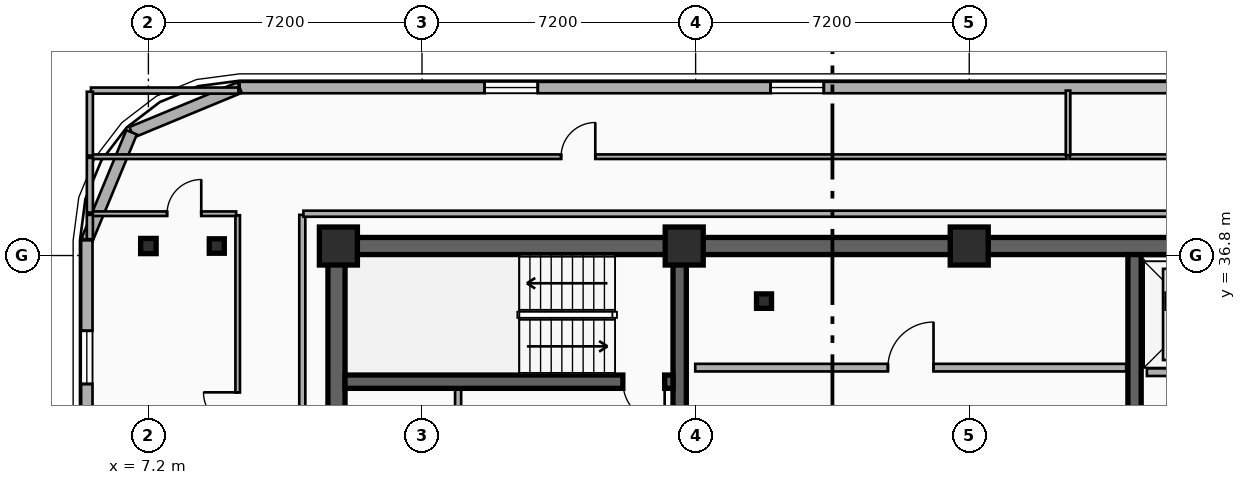
"""IFC4 building model, lengths in metres.
Left out: names, types, materials, properties, quantities, classifications, styles, units other than length and angle.
Written with IfcOpenShell. Run it as: python <this file> out.ifc"""

import sys

from ifc_helpers import new_model, si_unit, direction, frame, frame_2d, origin, origin_2d, place, context, subcontext, project, spatial, rectangle, i_section, extrude, element, fill, save


model = new_model("IFC4")
c1 = context("Model", 3, precision=1e-05, world=origin(), true_north=direction((0.0, 1.0)))
c2 = subcontext(c1, "Body", "Model", "MODEL_VIEW")
j1 = project(units=[si_unit("LENGTHUNIT", "METRE"), si_unit("PLANEANGLEUNIT", "RADIAN")], contexts=[c1])
p1 = place(None, origin())
s1 = spatial("IfcSite", under=j1, at=p1, CompositionType="ELEMENT")
p2 = place(p1, origin())
s2 = spatial("IfcBuilding", under=s1, at=p2, CompositionType="ELEMENT")
p3 = place(p2, frame((0.0, 0.0, 236.4)))
s3 = spatial("IfcBuildingStorey", under=s2, at=p3, CompositionType="ELEMENT", Elevation=236.4)
p4 = place(p3, frame((12.15, 37.05, 0.0), z_axis=(0.0, 0.0, 1.0), x_axis=(1.0, 0.0, 0.0)))
e1 = element("IfcWall", 1, at=p4, inside=s3, PredefinedType="SHEAR", context=c2, shape_type="SweptSolid", body=[
    extrude(rectangle(XDim=33.23, YDim=0.45, at=frame_2d((16.615, 0.0))), origin(), (0.0, 0.0, 1.0), 3.6),
])
p5 = place(p3, frame((12.15, 28.045, 0.0), z_axis=(0.0, 0.0, 1.0), x_axis=(0.0, 1.0, 0.0)))
e2 = element("IfcWall", 2, at=p5, inside=s3, PredefinedType="SHEAR", context=c2, shape_type="SweptSolid", body=[
    extrude(rectangle(XDim=8.78, YDim=0.45, at=frame_2d((4.39, 0.0))), origin(), (0.0, 0.0, 1.0), 3.6),
])
for number, where, z_axis, x_axis in (
    (3, (21.18, 28.045, 0.0), (0.0, 0.0, 1.0), (0.0, 1.0, 0.0)),
    (4, (33.15, 28.045, 0.0), (0.0, 0.0, 1.0), (0.0, 1.0, 0.0)),
):
    element("IfcWall", number, at=place(p3, frame(where, z_axis=z_axis, x_axis=x_axis)), inside=s3, PredefinedType="SHEAR", context=c2, shape_type="SweptSolid", body=[
        extrude(rectangle(XDim=8.78, YDim=0.35, at=frame_2d((4.39, 0.0))), origin(), (0.0, 0.0, 1.0), 3.6),
    ])
p6 = place(p3, frame((21.005, 33.48, 0.0), z_axis=(0.0, 0.0, 1.0), x_axis=(-1.0, 0.0, 0.0)))
e5 = element("IfcWall", 5, at=p6, inside=s3, PredefinedType="SHEAR", context=c2, shape_type="SweptSolid", body=[
    extrude(rectangle(XDim=8.63, YDim=0.35, at=frame_2d((4.315, 0.0))), origin(), (0.0, 0.0, 1.0), 3.6),
])
p7 = place(p6, frame((0.22, 0.0, 0.0)))
e6 = element("IfcOpeningElement", 6, at=p7, cuts=e5, PredefinedType="OPENING", context=c2, shape_type="SweptSolid", body=[
    extrude(rectangle(XDim=1.1, YDim=2.15, at=frame_2d((0.55, 1.075))), frame((0.0, 0.185, 0.0), z_axis=(0.0, -1.0, 0.0), x_axis=(1.0, 0.0, 0.0)), (0.0, 0.0, 1.0), 0.37),
])
p8 = place(p3, frame((23.4, 35.6, 0.0), z_axis=(0.0, 0.0, 1.0), x_axis=(1.0, 0.0, 0.0)))
e7 = element("IfcColumn", 7, at=p8, inside=s3, PredefinedType="COLUMN", context=c2, shape_type="SweptSolid", body=[
    extrude(i_section(OverallWidth=0.395, OverallDepth=0.38, WebThickness=0.019, FlangeThickness=0.03, FilletRadius=0.015, at=origin_2d()), origin(), (0.0, 0.0, 1.0), 3.6),
])
for number, where, z_axis, x_axis in (
    (8, (12.2, 37.05, 0.0), (0.0, 0.0, 1.0), (1.0, 0.0, 0.0)),
    (9, (21.3, 37.05, 0.0), (0.0, 0.0, 1.0), (1.0, 0.0, 0.0)),
    (10, (28.8, 37.05, 0.0), (0.0, 0.0, 1.0), (1.0, 0.0, 0.0)),
):
    element("IfcColumn", number, at=place(p3, frame(where, z_axis=z_axis, x_axis=x_axis)), inside=s3, PredefinedType="COLUMN", context=c2, shape_type="SweptSolid", body=[
        extrude(rectangle(XDim=1.0, YDim=1.0, at=origin_2d()), origin(), (0.0, 0.0, 1.0), 3.6),
    ])
p9 = place(p3, frame((9.0, 37.05, 0.0), z_axis=(0.0, 0.0, 1.0), x_axis=(1.0, 0.0, 0.0)))
e11 = element("IfcColumn", 11, at=p9, inside=s3, PredefinedType="COLUMN", context=c2, shape_type="SweptSolid", body=[
    extrude(i_section(OverallWidth=0.395, OverallDepth=0.38, WebThickness=0.019, FlangeThickness=0.03, FilletRadius=0.015, at=origin_2d()), origin(), (0.0, 0.0, 1.0), 3.6),
])
p10 = place(p3, frame((7.2, 37.05, 0.0), z_axis=(0.0, 0.0, 1.0), x_axis=(1.0, 0.0, 0.0)))
e12 = element("IfcColumn", 12, at=p10, inside=s3, PredefinedType="COLUMN", context=c2, shape_type="SweptSolid", body=[
    extrude(i_section(OverallWidth=0.408, OverallDepth=0.4, WebThickness=0.025, FlangeThickness=0.039, FilletRadius=0.015, at=origin_2d()), origin(), (0.0, 0.0, 1.0), 3.6),
])
p11 = place(p3, frame((9.6, 41.22, 0.0), z_axis=(0.0, 0.0, 1.0), x_axis=(1.0, 0.0, 0.0)))
e13 = element("IfcWall", 13, at=p11, inside=s3, PredefinedType="SOLIDWALL", context=c2, shape_type="SweptSolid", body=[
    extrude(rectangle(XDim=38.4, YDim=0.3, at=frame_2d((19.2, 0.0))), origin(), (0.0, 0.0, 1.0), 3.34),
])
p12 = place(p11, frame((6.447, 0.0, 0.75)))
e14 = element("IfcOpeningElement", 14, at=p12, cuts=e13, PredefinedType="OPENING", context=c2, shape_type="SweptSolid", body=[
    extrude(rectangle(XDim=1.4, YDim=2.1, at=frame_2d((0.7, 1.05))), frame((0.0, 0.16, 0.0), z_axis=(0.0, -1.0, 0.0), x_axis=(1.0, 0.0, 0.0)), (0.0, 0.0, 1.0), 0.32),
])
p13 = place(p11, frame((13.973, 0.0, 0.75)))
e15 = element("IfcOpeningElement", 15, at=p13, cuts=e13, PredefinedType="OPENING", context=c2, shape_type="SweptSolid", body=[
    extrude(rectangle(XDim=1.4, YDim=2.1, at=frame_2d((0.7, 1.05))), frame((0.0, 0.16, 0.0), z_axis=(0.0, -1.0, 0.0), x_axis=(1.0, 0.0, 0.0)), (0.0, 0.0, 1.0), 0.32),
])
p14 = place(p11, frame((26.493, 0.0, 0.75)))
e16 = element("IfcOpeningElement", 16, at=p14, cuts=e13, PredefinedType="OPENING", context=c2, shape_type="SweptSolid", body=[
    extrude(rectangle(XDim=1.4, YDim=2.1, at=frame_2d((0.7, 1.05))), frame((0.0, 0.16, 0.0), z_axis=(0.0, -1.0, 0.0), x_axis=(1.0, 0.0, 0.0)), (0.0, 0.0, 1.0), 0.32),
])
p15 = place(p11, frame((32.287, 0.0, 0.75)))
e17 = element("IfcOpeningElement", 17, at=p15, cuts=e13, PredefinedType="OPENING", context=c2, shape_type="SweptSolid", body=[
    extrude(rectangle(XDim=1.4, YDim=2.1, at=frame_2d((0.7, 1.05))), frame((0.0, 0.16, 0.0), z_axis=(0.0, -1.0, 0.0), x_axis=(1.0, 0.0, 0.0)), (0.0, 0.0, 1.0), 0.32),
])
p16 = place(p3, frame((6.757, 40.042, 0.0), z_axis=(0.0, 0.0, 1.0), x_axis=(0.923882414032, 0.382676475685, 0.0)))
e18 = element("IfcWall", 18, at=p16, inside=s3, PredefinedType="SOLIDWALL", context=c2, shape_type="SweptSolid", body=[
    extrude(rectangle(XDim=3.077, YDim=0.3, at=frame_2d((1.539, 0.0))), origin(), (0.0, 0.0, 1.0), 3.34),
])
p17 = place(p3, frame((5.58, 37.2, 0.0), z_axis=(0.0, 0.0, 1.0), x_axis=(0.382636798336, 0.92389884758, 0.0)))
e19 = element("IfcWall", 19, at=p17, inside=s3, PredefinedType="SOLIDWALL", context=c2, shape_type="SweptSolid", body=[
    extrude(rectangle(XDim=3.077, YDim=0.3, at=frame_2d((1.538, 0.0))), origin(), (0.0, 0.0, 1.0), 3.34),
])
p18 = place(p3, frame((5.58, 8.6, 0.0), z_axis=(0.0, 0.0, 1.0), x_axis=(0.0, 1.0, 0.0)))
e20 = element("IfcWall", 20, at=p18, inside=s3, PredefinedType="SOLIDWALL", context=c2, shape_type="SweptSolid", body=[
    extrude(rectangle(XDim=28.6, YDim=0.3, at=frame_2d((14.3, 0.0))), origin(), (0.0, 0.0, 1.0), 3.34),
])
p19 = place(p18, frame((21.36, 0.0, 0.34)))
e21 = element("IfcOpeningElement", 21, at=p19, cuts=e20, PredefinedType="OPENING", context=c2, shape_type="SweptSolid", body=[
    extrude(rectangle(XDim=1.4, YDim=2.1, at=frame_2d((0.7, 1.05))), frame((0.0, 0.16, 0.0), z_axis=(0.0, -1.0, 0.0), x_axis=(1.0, 0.0, 0.0)), (0.0, 0.0, 1.0), 0.32),
])
p20 = place(p18, frame((24.82, 0.0, 0.34)))
e22 = element("IfcOpeningElement", 22, at=p20, cuts=e20, PredefinedType="OPENING", context=c2, shape_type="SweptSolid", body=[
    extrude(rectangle(XDim=1.4, YDim=2.1, at=frame_2d((0.7, 1.05))), frame((0.0, 0.16, 0.0), z_axis=(0.0, -1.0, 0.0), x_axis=(1.0, 0.0, 0.0)), (0.0, 0.0, 1.0), 0.32),
])
p21 = place(p18, frame((4.797, 0.0, 0.34)))
e23 = element("IfcOpeningElement", 23, at=p21, cuts=e20, PredefinedType="OPENING", context=c2, shape_type="SweptSolid", body=[
    extrude(rectangle(XDim=1.4, YDim=2.1, at=frame_2d((0.7, 1.05))), frame((0.0, 0.16, 0.0), z_axis=(0.0, -1.0, 0.0), x_axis=(1.0, 0.0, 0.0)), (0.0, 0.0, 1.0), 0.32),
])
p22 = place(p18, frame((10.673, 0.0, 0.34)))
e24 = element("IfcOpeningElement", 24, at=p22, cuts=e20, PredefinedType="OPENING", context=c2, shape_type="SweptSolid", body=[
    extrude(rectangle(XDim=1.4, YDim=2.1, at=frame_2d((0.7, 1.05))), frame((0.0, 0.16, 0.0), z_axis=(0.0, -1.0, 0.0), x_axis=(1.0, 0.0, 0.0)), (0.0, 0.0, 1.0), 0.32),
])
p23 = place(p3, frame((33.475, 33.73, 0.0), z_axis=(0.0, 0.0, 1.0), x_axis=(1.0, 0.0, 0.0)))
e25 = element("IfcWall", 25, at=p23, inside=s3, PredefinedType="PARTITIONING", context=c2, shape_type="SweptSolid", body=[
    extrude(rectangle(XDim=2.725, YDim=0.2, at=frame_2d((1.362, 0.0))), origin(), (0.0, 0.0, 1.0), 2.41),
])
p24 = place(p23, frame((0.812, 0.0, 0.0)))
e26 = element("IfcOpeningElement", 26, at=p24, cuts=e25, PredefinedType="OPENING", context=c2, shape_type="SweptSolid", body=[
    extrude(rectangle(XDim=1.1, YDim=2.15, at=frame_2d((0.55, 1.075))), frame((0.0, 0.11, 0.0), z_axis=(0.0, -1.0, 0.0), x_axis=(1.0, 0.0, 0.0)), (0.0, 0.0, 1.0), 0.22),
])
p25 = place(p3, frame((21.59, 33.85, 0.0), z_axis=(0.0, 0.0, 1.0), x_axis=(1.0, 0.0, 0.0)))
e27 = element("IfcWall", 27, at=p25, inside=s3, PredefinedType="PARTITIONING", context=c2, shape_type="SweptSolid", body=[
    extrude(rectangle(XDim=11.34, YDim=0.2, at=frame_2d((5.67, 0.0))), origin(), (0.0, 0.0, 1.0), 2.41),
])
p26 = place(p25, frame((5.07, 0.0, 0.0)))
e28 = element("IfcOpeningElement", 28, at=p26, cuts=e27, PredefinedType="OPENING", context=c2, shape_type="SweptSolid", body=[
    extrude(rectangle(XDim=1.2, YDim=2.15, at=frame_2d((0.6, 1.075))), frame((0.0, 0.11, 0.0), z_axis=(0.0, -1.0, 0.0), x_axis=(1.0, 0.0, 0.0)), (0.0, 0.0, 1.0), 0.22),
])
p27 = place(p3, frame((9.55, 27.64, 0.0), z_axis=(0.0, 0.0, 1.0), x_axis=(0.0, 1.0, 0.0)))
e29 = element("IfcWall", 29, at=p27, inside=s3, PredefinedType="PARTITIONING", context=c2, shape_type="SweptSolid", body=[
    extrude(rectangle(XDim=10.22, YDim=0.12, at=frame_2d((5.11, 0.0))), origin(), (0.0, 0.0, 1.0), 2.82),
])
p28 = place(p27, frame((4.66, 0.0, 0.0)))
e30 = element("IfcOpeningElement", 30, at=p28, cuts=e29, PredefinedType="OPENING", context=c2, shape_type="SweptSolid", body=[
    extrude(rectangle(XDim=0.9, YDim=2.1, at=frame_2d((0.45, 1.05))), frame((0.0, 0.07, 0.0), z_axis=(0.0, -1.0, 0.0), x_axis=(1.0, 0.0, 0.0)), (0.0, 0.0, 1.0), 0.14),
])
p29 = place(p3, frame((5.66, 37.9, 0.0), z_axis=(0.0, 0.0, 1.0), x_axis=(1.0, 0.0, 0.0)))
e31 = element("IfcWall", 31, at=p29, inside=s3, PredefinedType="PARTITIONING", context=c2, shape_type="SweptSolid", body=[
    extrude(rectangle(XDim=3.85, YDim=0.12, at=frame_2d((1.925, 0.0))), origin(), (0.0, 0.0, 1.0), 3.34),
])
p30 = place(p29, frame((2.031, 0.0, 0.0)))
e32 = element("IfcOpeningElement", 32, at=p30, cuts=e31, PredefinedType="OPENING", context=c2, shape_type="SweptSolid", body=[
    extrude(rectangle(XDim=0.9, YDim=2.1, at=frame_2d((0.45, 1.05))), frame((0.0, 0.07, 0.0), z_axis=(0.0, -1.0, 0.0), x_axis=(1.0, 0.0, 0.0)), (0.0, 0.0, 1.0), 0.14),
])
p31 = place(p3, frame((5.66, 39.4, 0.0), z_axis=(0.0, 0.0, 1.0), x_axis=(1.0, 0.0, 0.0)))
e33 = element("IfcWall", 33, at=p31, inside=s3, PredefinedType="PARTITIONING", context=c2, shape_type="SweptSolid", body=[
    extrude(rectangle(XDim=25.7, YDim=0.12, at=frame_2d((12.85, 0.0))), origin(), (0.0, 0.0, 1.0), 3.34),
])
p32 = place(p31, frame((12.4, 0.0, 0.0)))
e34 = element("IfcOpeningElement", 34, at=p32, cuts=e33, PredefinedType="OPENING", context=c2, shape_type="SweptSolid", body=[
    extrude(rectangle(XDim=0.9, YDim=2.1, at=frame_2d((0.45, 1.05))), frame((0.0, 0.07, 0.0), z_axis=(0.0, -1.0, 0.0), x_axis=(1.0, 0.0, 0.0)), (0.0, 0.0, 1.0), 0.14),
])
p33 = place(p3, frame((31.44, 39.4, 0.0), z_axis=(0.0, 0.0, 1.0), x_axis=(1.0, 0.0, 0.0)))
e35 = element("IfcWall", 35, at=p33, inside=s3, PredefinedType="PARTITIONING", context=c2, shape_type="SweptSolid", body=[
    extrude(rectangle(XDim=20.5, YDim=0.12, at=frame_2d((10.25, 0.0))), origin(), (0.0, 0.0, 1.0), 3.34),
])
p34 = place(p33, frame((9.8, 0.0, 0.0)))
e36 = element("IfcOpeningElement", 36, at=p34, cuts=e35, PredefinedType="OPENING", context=c2, shape_type="SweptSolid", body=[
    extrude(rectangle(XDim=0.9, YDim=2.1, at=frame_2d((0.45, 1.05))), frame((0.0, 0.07, 0.0), z_axis=(0.0, -1.0, 0.0), x_axis=(1.0, 0.0, 0.0)), (0.0, 0.0, 1.0), 0.14),
])
p35 = place(p3, frame((31.4, 39.44, 0.0), z_axis=(0.0, 0.0, 1.0), x_axis=(0.0, 1.0, 0.0)))
e37 = element("IfcWall", 37, at=p35, inside=s3, PredefinedType="PARTITIONING", context=c2, shape_type="SweptSolid", body=[
    extrude(rectangle(XDim=1.7, YDim=0.12, at=frame_2d((0.85, 0.0))), origin(), (0.0, 0.0, 1.0), 3.34),
])
p36 = place(p3, frame((15.35, 30.96, 0.0), z_axis=(0.0, 0.0, 1.0), x_axis=(0.0, 1.0, 0.0)))
e38 = element("IfcWall", 38, at=p36, inside=s3, PredefinedType="PARTITIONING", context=c2, shape_type="SweptSolid", body=[
    extrude(rectangle(XDim=2.31, YDim=0.16, at=frame_2d((1.155, 0.0))), origin(), (0.0, 0.0, 1.0), 3.34),
])
p37 = place(p3, frame((11.25, 27.63, 0.0), z_axis=(0.0, 0.0, 1.0), x_axis=(0.0, 1.0, 0.0)))
e39 = element("IfcWall", 39, at=p37, inside=s3, PredefinedType="PARTITIONING", context=c2, shape_type="SweptSolid", body=[
    extrude(rectangle(XDim=10.24, YDim=0.16, at=frame_2d((5.12, 0.0))), origin(), (0.0, 0.0, 1.0), 2.82),
])
p38 = place(p3, frame((11.28, 37.9, 0.0), z_axis=(0.0, 0.0, 1.0), x_axis=(1.0, 0.0, 0.0)))
e40 = element("IfcWall", 40, at=p38, inside=s3, PredefinedType="PARTITIONING", context=c2, shape_type="SweptSolid", body=[
    extrude(rectangle(XDim=35.04, YDim=0.16, at=frame_2d((17.52, 0.0))), origin(), (0.0, 0.0, 1.0), 3.34),
])
p39 = place(p3, frame((5.66, 37.93, 0.0), z_axis=(0.0, 0.0, 1.0), x_axis=(0.0, 1.0, 0.0)))
e41 = element("IfcWall", 41, at=p39, inside=s3, PredefinedType="PARTITIONING", context=c2, shape_type="SweptSolid", body=[
    extrude(rectangle(XDim=1.44, YDim=0.16, at=frame_2d((0.72, 0.0))), origin(), (0.0, 0.0, 1.0), 3.34),
])
p40 = place(p3, frame((5.66, 37.23, 0.0), z_axis=(0.0, 0.0, 1.0), x_axis=(0.0, 1.0, 0.0)))
e42 = element("IfcWall", 42, at=p40, inside=s3, PredefinedType="PARTITIONING", context=c2, shape_type="SweptSolid", body=[
    extrude(rectangle(XDim=0.64, YDim=0.16, at=frame_2d((0.32, 0.0))), origin(), (0.0, 0.0, 1.0), 3.34),
])
p41 = place(p3, frame((5.69, 41.14, 0.0), z_axis=(0.0, 0.0, 1.0), x_axis=(1.0, 0.0, 0.0)))
e43 = element("IfcWall", 43, at=p41, inside=s3, PredefinedType="PARTITIONING", context=c2, shape_type="SweptSolid", body=[
    extrude(rectangle(XDim=3.88, YDim=0.16, at=frame_2d((1.94, 0.0))), origin(), (0.0, 0.0, 1.0), 3.34),
])
p42 = place(p3, frame((5.66, 39.43, 0.0), z_axis=(0.0, 0.0, 1.0), x_axis=(0.0, 1.0, 0.0)))
e44 = element("IfcWall", 44, at=p42, inside=s3, PredefinedType="PARTITIONING", context=c2, shape_type="SweptSolid", body=[
    extrude(rectangle(XDim=1.68, YDim=0.16, at=frame_2d((0.84, 0.0))), origin(), (0.0, 0.0, 1.0), 3.34),
])
p43 = place(p12, origin())
e45 = element("IfcWindow", 45, at=p43, inside=s3, PartitioningType="SINGLE_PANEL", PredefinedType="WINDOW", context=c2, shape_type="SweptSolid", body=[
    extrude(rectangle(XDim=1.4, YDim=2.1, at=frame_2d((0.7, 1.05))), frame((0.0, 0.03, 0.0), z_axis=(0.0, -1.0, 0.0), x_axis=(1.0, 0.0, 0.0)), (0.0, 0.0, 1.0), 0.06),
])
fill(e14, e45)
p44 = place(p13, origin())
e46 = element("IfcWindow", 46, at=p44, inside=s3, PartitioningType="SINGLE_PANEL", PredefinedType="WINDOW", context=c2, shape_type="SweptSolid", body=[
    extrude(rectangle(XDim=1.4, YDim=2.1, at=frame_2d((0.7, 1.05))), frame((0.0, 0.03, 0.0), z_axis=(0.0, -1.0, 0.0), x_axis=(1.0, 0.0, 0.0)), (0.0, 0.0, 1.0), 0.06),
])
fill(e15, e46)
p45 = place(p20, origin())
e47 = element("IfcWindow", 47, at=p45, inside=s3, PartitioningType="SINGLE_PANEL", PredefinedType="WINDOW", context=c2, shape_type="SweptSolid", body=[
    extrude(rectangle(XDim=1.4, YDim=2.1, at=frame_2d((0.7, 1.05))), frame((0.0, 0.03, 0.0), z_axis=(0.0, -1.0, 0.0), x_axis=(1.0, 0.0, 0.0)), (0.0, 0.0, 1.0), 0.06),
])
fill(e22, e47)
p46 = place(p7, origin())
e48 = element("IfcDoor", 48, at=p46, inside=s3, OperationType="SINGLE_SWING_LEFT", PredefinedType="DOOR", context=c2, shape_type="SweptSolid", body=[
    extrude(rectangle(XDim=1.1, YDim=2.15, at=frame_2d((0.55, 1.075))), frame((0.0, 0.025, 0.0), z_axis=(0.0, -1.0, 0.0), x_axis=(1.0, 0.0, 0.0)), (0.0, 0.0, 1.0), 0.05),
])
fill(e6, e48)
p47 = place(p26, origin())
e49 = element("IfcDoor", 49, at=p47, inside=s3, OperationType="SINGLE_SWING_RIGHT", PredefinedType="DOOR", context=c2, shape_type="SweptSolid", body=[
    extrude(rectangle(XDim=1.2, YDim=2.15, at=frame_2d((0.6, 1.075))), frame((0.0, 0.025, 0.0), z_axis=(0.0, -1.0, 0.0), x_axis=(1.0, 0.0, 0.0)), (0.0, 0.0, 1.0), 0.05),
])
fill(e28, e49)
p48 = place(p28, origin())
e50 = element("IfcDoor", 50, at=p48, inside=s3, OperationType="SINGLE_SWING_RIGHT", PredefinedType="DOOR", context=c2, shape_type="SweptSolid", body=[
    extrude(rectangle(XDim=0.9, YDim=2.1, at=frame_2d((0.45, 1.05))), frame((0.0, 0.025, 0.0), z_axis=(0.0, -1.0, 0.0), x_axis=(1.0, 0.0, 0.0)), (0.0, 0.0, 1.0), 0.05),
])
fill(e30, e50)
p49 = place(p30, origin())
e51 = element("IfcDoor", 51, at=p49, inside=s3, OperationType="SINGLE_SWING_RIGHT", PredefinedType="DOOR", context=c2, shape_type="SweptSolid", body=[
    extrude(rectangle(XDim=0.9, YDim=2.1, at=frame_2d((0.45, 1.05))), frame((0.0, 0.025, 0.0), z_axis=(0.0, -1.0, 0.0), x_axis=(1.0, 0.0, 0.0)), (0.0, 0.0, 1.0), 0.05),
])
fill(e32, e51)
p50 = place(p32, origin())
e52 = element("IfcDoor", 52, at=p50, inside=s3, OperationType="SINGLE_SWING_RIGHT", PredefinedType="DOOR", context=c2, shape_type="SweptSolid", body=[
    extrude(rectangle(XDim=0.9, YDim=2.1, at=frame_2d((0.45, 1.05))), frame((0.0, 0.025, 0.0), z_axis=(0.0, -1.0, 0.0), x_axis=(1.0, 0.0, 0.0)), (0.0, 0.0, 1.0), 0.05),
])
fill(e34, e52)
save(model, sys.argv[1])
